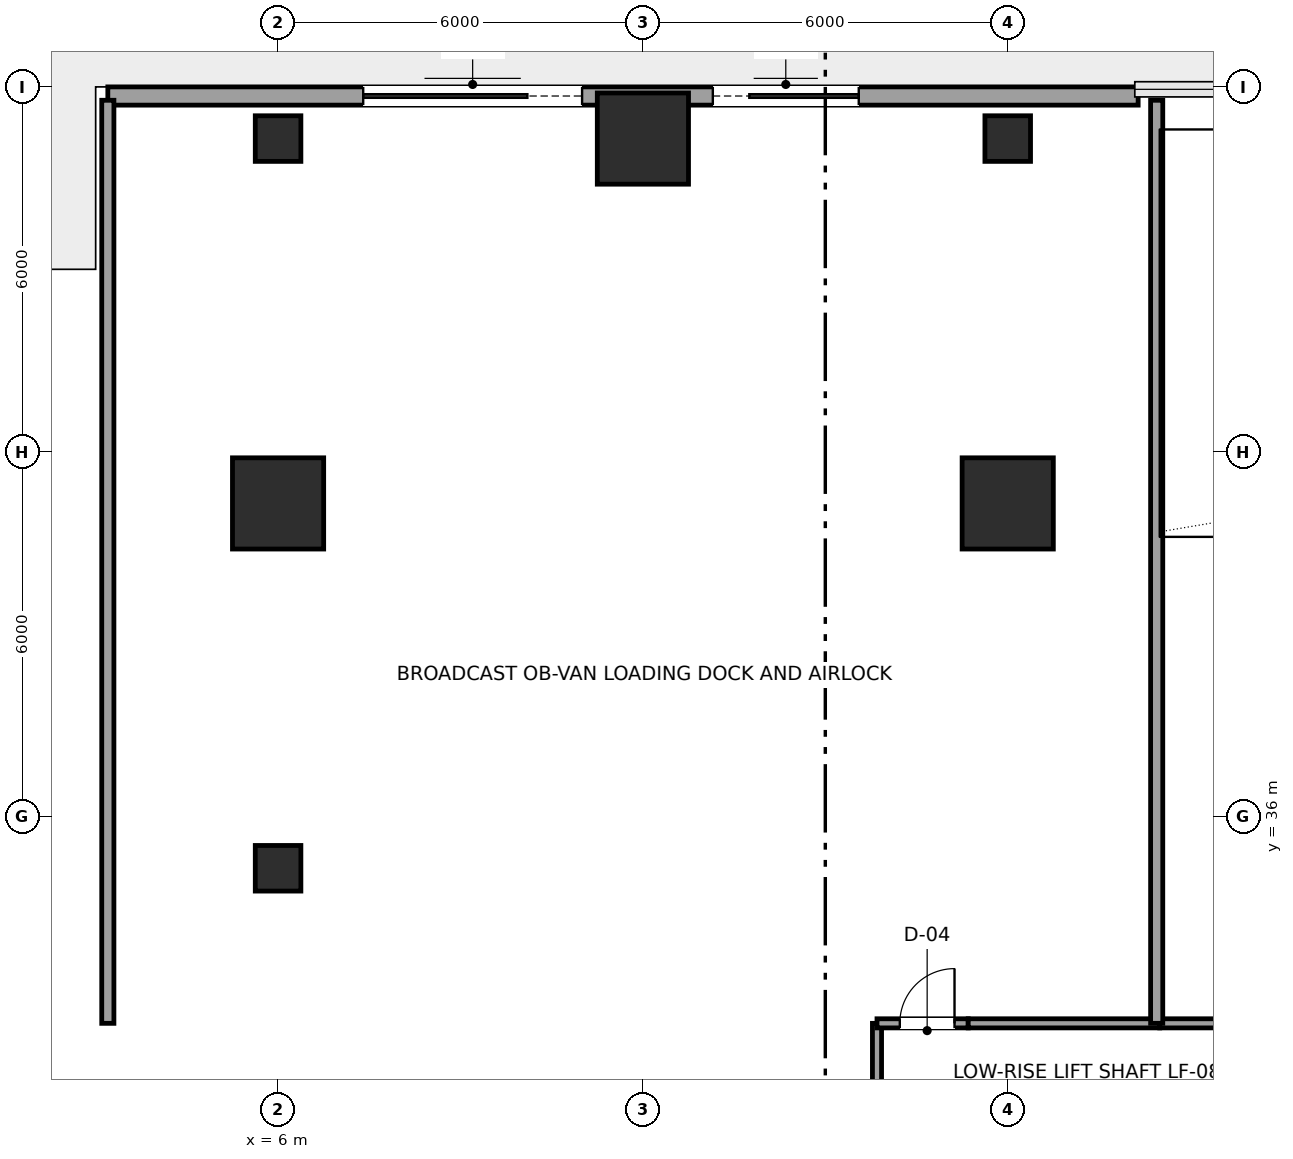
"""IFC4 building model, lengths in metres.
Left out: names, types, materials, properties, quantities, classifications, styles, units other than length and angle.
Written with IfcOpenShell. Run it as: python <this file> out.ifc"""

import sys

from ifc_helpers import new_model, si_unit, direction, frame, frame_2d, origin, origin_2d, place, context, subcontext, project, spatial, rectangle, hollow_rectangle, extrude, element, fill, save


model = new_model("IFC4")
c1 = context("Model", 3, precision=1e-05, world=origin(), true_north=direction((0.0, 1.0)))
c2 = subcontext(c1, "Body", "Model", "MODEL_VIEW")
j1 = project(units=[si_unit("LENGTHUNIT", "METRE"), si_unit("PLANEANGLEUNIT", "RADIAN")], contexts=[c1])
p1 = place(None, origin())
s1 = spatial("IfcSite", under=j1, at=p1, CompositionType="ELEMENT")
p2 = place(p1, origin())
s2 = spatial("IfcBuilding", under=s1, at=p2, CompositionType="ELEMENT")
p3 = place(p2, origin())
s3 = spatial("IfcBuildingStorey", under=s2, at=p3, CompositionType="ELEMENT", Elevation=0.0)
p4 = place(p3, frame((6.0, 35.15, 0.0), z_axis=(0.0, 0.0, 1.0), x_axis=(1.0, 0.0, 0.0)))
e1 = element("IfcColumn", 1, at=p4, inside=s3, PredefinedType="COLUMN", context=c2, shape_type="SweptSolid", body=[
    extrude(hollow_rectangle(XDim=0.75, YDim=0.75, WallThickness=0.035, InnerFilletRadius=0.035, OuterFilletRadius=0.05, at=origin_2d()), origin(), (0.0, 0.0, 1.0), 5.7),
])
p5 = place(p3, frame((6.0, 41.15, 0.0), z_axis=(0.0, 0.0, 1.0), x_axis=(1.0, 0.0, 0.0)))
e2 = element("IfcColumn", 2, at=p5, inside=s3, PredefinedType="COLUMN", context=c2, shape_type="SweptSolid", body=[
    extrude(rectangle(XDim=1.5, YDim=1.5, at=origin_2d()), origin(), (0.0, 0.0, 1.0), 5.7),
])
p6 = place(p3, frame((6.0, 47.15, 0.0), z_axis=(0.0, 0.0, 1.0), x_axis=(1.0, 0.0, 0.0)))
e3 = element("IfcColumn", 3, at=p6, inside=s3, PredefinedType="COLUMN", context=c2, shape_type="SweptSolid", body=[
    extrude(hollow_rectangle(XDim=0.75, YDim=0.75, WallThickness=0.035, InnerFilletRadius=0.035, OuterFilletRadius=0.05, at=origin_2d()), origin(), (0.0, 0.0, 1.0), 5.7),
])
for number, where, z_axis, x_axis in (
    (4, (12.0, 47.15, 0.0), (0.0, 0.0, 1.0), (1.0, 0.0, 0.0)),
    (5, (18.0, 41.15, 0.0), (0.0, 0.0, 1.0), (1.0, 0.0, 0.0)),
):
    element("IfcColumn", number, at=place(p3, frame(where, z_axis=z_axis, x_axis=x_axis)), inside=s3, PredefinedType="COLUMN", context=c2, shape_type="SweptSolid", body=[
        extrude(rectangle(XDim=1.5, YDim=1.5, at=origin_2d()), origin(), (0.0, 0.0, 1.0), 5.7),
    ])
p7 = place(p3, frame((18.0, 47.15, 0.0), z_axis=(0.0, 0.0, 1.0), x_axis=(1.0, 0.0, 0.0)))
e6 = element("IfcColumn", 6, at=p7, inside=s3, PredefinedType="COLUMN", context=c2, shape_type="SweptSolid", body=[
    extrude(hollow_rectangle(XDim=0.75, YDim=0.75, WallThickness=0.035, InnerFilletRadius=0.035, OuterFilletRadius=0.05, at=origin_2d()), origin(), (0.0, 0.0, 1.0), 5.7),
])
p8 = place(p3, frame((3.2, 47.85, 0.0), z_axis=(0.0, 0.0, 1.0), x_axis=(1.0, 0.0, 0.0)))
e7 = element("IfcWall", 7, at=p8, inside=s3, PredefinedType="SOLIDWALL", context=c2, shape_type="SweptSolid", body=[
    extrude(rectangle(XDim=16.945, YDim=0.3, at=frame_2d((8.473, 0.0))), origin(), (0.0, 0.0, 1.0), 5.4),
])
p9 = place(p8, frame((4.2, 0.0, 0.0)))
e8 = element("IfcOpeningElement", 8, at=p9, cuts=e7, PredefinedType="OPENING", context=c2, shape_type="SweptSolid", body=[
    extrude(rectangle(XDim=3.6, YDim=2.5, at=frame_2d((1.8, 1.25))), frame((0.0, 0.16, 0.0), z_axis=(0.0, -1.0, 0.0), x_axis=(1.0, 0.0, 0.0)), (0.0, 0.0, 1.0), 0.32),
])
p10 = place(p8, frame((9.95, 0.0, 0.0)))
e9 = element("IfcOpeningElement", 9, at=p10, cuts=e7, PredefinedType="OPENING", context=c2, shape_type="SweptSolid", body=[
    extrude(rectangle(XDim=2.4, YDim=2.4, at=frame_2d((1.2, 1.2))), frame((0.0, 0.16, 0.0), z_axis=(0.0, -1.0, 0.0), x_axis=(1.0, 0.0, 0.0)), (0.0, 0.0, 1.0), 0.32),
])
p11 = place(p3, frame((15.85, 30.2, 0.0), z_axis=(0.0, 0.0, 1.0), x_axis=(0.0, 1.0, 0.0)))
e10 = element("IfcWall", 10, at=p11, inside=s3, PredefinedType="PARTITIONING", context=c2, shape_type="SweptSolid", body=[
    extrude(rectangle(XDim=2.4, YDim=0.15, at=frame_2d((1.2, 0.0))), origin(), (0.0, 0.0, 1.0), 5.4),
])
p12 = place(p3, frame((15.85, 32.6, 0.0), z_axis=(0.0, 0.0, 1.0), x_axis=(1.0, 0.0, 0.0)))
e11 = element("IfcWall", 11, at=p12, inside=s3, PredefinedType="PARTITIONING", context=c2, shape_type="SweptSolid", body=[
    extrude(rectangle(XDim=1.5, YDim=0.15, at=frame_2d((0.75, 0.0))), origin(), (0.0, 0.0, 1.0), 5.4),
])
p13 = place(p12, frame((0.375, 0.0, 0.0)))
e12 = element("IfcOpeningElement", 12, at=p13, cuts=e11, PredefinedType="OPENING", context=c2, shape_type="SweptSolid", body=[
    extrude(rectangle(XDim=0.9, YDim=2.15, at=frame_2d((0.45, 1.075))), frame((0.0, 0.085, 0.0), z_axis=(0.0, -1.0, 0.0), x_axis=(1.0, 0.0, 0.0)), (0.0, 0.0, 1.0), 0.17),
])
p14 = place(p3, frame((17.35, 32.6, 0.0), z_axis=(0.0, 0.0, 1.0), x_axis=(1.0, 0.0, 0.0)))
e13 = element("IfcWall", 13, at=p14, inside=s3, PredefinedType="PARTITIONING", context=c2, shape_type="SweptSolid", body=[
    extrude(rectangle(XDim=3.15, YDim=0.15, at=frame_2d((1.575, 0.0))), origin(), (0.0, 0.0, 1.0), 5.4),
])
p15 = place(p3, frame((20.5, 32.6, 0.0), z_axis=(0.0, 0.0, 1.0), x_axis=(1.0, 0.0, 0.0)))
e14 = element("IfcWall", 14, at=p15, inside=s3, PredefinedType="PARTITIONING", context=c2, shape_type="SweptSolid", body=[
    extrude(rectangle(XDim=5.55, YDim=0.15, at=frame_2d((2.775, 0.0))), origin(), (0.0, 0.0, 1.0), 5.4),
])
for number, where, z_axis, x_axis in (
    (15, (3.2, 32.6, 0.0), (0.0, 0.0, 1.0), (0.0, 1.0, 0.0)),
    (16, (20.45, 32.6, 0.0), (0.0, 0.0, 1.0), (0.0, 1.0, 0.0)),
):
    element("IfcWall", number, at=place(p3, frame(where, z_axis=z_axis, x_axis=x_axis)), inside=s3, PredefinedType="SOLIDWALL", context=c2, shape_type="SweptSolid", body=[
        extrude(rectangle(XDim=15.18, YDim=0.2, at=frame_2d((7.59, 0.0))), origin(), (0.0, 0.0, 1.0), 5.4),
    ])
p16 = place(p9, origin())
e17 = element("IfcDoor", 17, at=p16, inside=s3, OperationType="SLIDING_TO_LEFT", PredefinedType="GATE", context=c2, shape_type="SweptSolid", body=[
    extrude(rectangle(XDim=3.6, YDim=2.5, at=frame_2d((1.8, 1.25))), frame((0.0, 0.025, 0.0), z_axis=(0.0, -1.0, 0.0), x_axis=(1.0, 0.0, 0.0)), (0.0, 0.0, 1.0), 0.05),
])
fill(e8, e17)
p17 = place(p10, origin())
e18 = element("IfcDoor", 18, at=p17, inside=s3, OperationType="SLIDING_TO_RIGHT", PredefinedType="GATE", context=c2, shape_type="SweptSolid", body=[
    extrude(rectangle(XDim=2.4, YDim=2.4, at=frame_2d((1.2, 1.2))), frame((0.0, 0.025, 0.0), z_axis=(0.0, -1.0, 0.0), x_axis=(1.0, 0.0, 0.0)), (0.0, 0.0, 1.0), 0.05),
])
fill(e9, e18)
p18 = place(p13, origin())
e19 = element("IfcDoor", 19, at=p18, inside=s3, OperationType="SINGLE_SWING_RIGHT", PredefinedType="DOOR", context=c2, shape_type="SweptSolid", body=[
    extrude(rectangle(XDim=0.9, YDim=2.15, at=frame_2d((0.45, 1.075))), frame((0.0, 0.025, 0.0), z_axis=(0.0, -1.0, 0.0), x_axis=(1.0, 0.0, 0.0)), (0.0, 0.0, 1.0), 0.05),
])
fill(e12, e19)
save(model, sys.argv[1])
